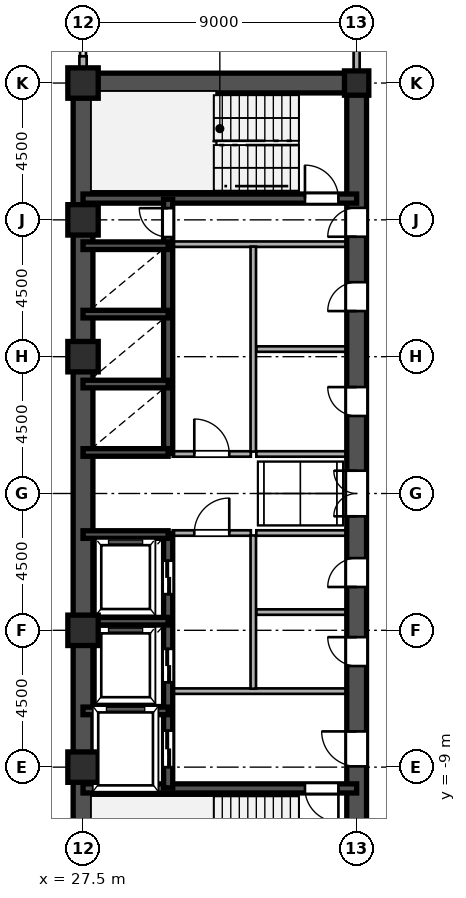
"""IFC4 building model, lengths in metres.
Left out: names, types, materials, properties, quantities, classifications, styles, units other than length and angle.
Written with IfcOpenShell. Run it as: python <this file> out.ifc"""

import sys

from ifc_helpers import new_model, si_unit, direction, frame, frame_2d, origin, origin_2d, place, context, subcontext, project, spatial, rectangle, hollow_rectangle, i_section, extrude, source, transform, mapped, element, fill, save


model = new_model("IFC4")
c1 = context("Model", 3, precision=1e-05, world=origin(), true_north=direction((0.0, 1.0)))
c2 = subcontext(c1, "Body", "Model", "MODEL_VIEW")
j1 = project(units=[si_unit("LENGTHUNIT", "METRE"), si_unit("PLANEANGLEUNIT", "RADIAN")], contexts=[c1])
p1 = place(None, origin())
s1 = spatial("IfcSite", under=j1, at=p1, CompositionType="ELEMENT")
p2 = place(p1, origin())
s2 = spatial("IfcBuilding", under=s1, at=p2, CompositionType="ELEMENT")
p3 = place(p2, frame((0.0, 0.0, 72.9)))
s3 = spatial("IfcBuildingStorey", under=s2, at=p3, CompositionType="ELEMENT", Elevation=72.9)
m1 = source(origin(), c2, "Body", "SweptSolid", [
    extrude(hollow_rectangle(XDim=1.0, YDim=1.0, WallThickness=0.042, at=origin_2d()), origin(), (0.0, 0.0, 1.0), 3.6),
])
for number, where, z_axis, x_axis in (
    (1, (27.5, -9.0, 0.0), (0.0, 0.0, 1.0), (1.0, 0.0, 0.0)),
    (2, (27.5, -4.5, 0.0), (0.0, 0.0, 1.0), (1.0, 0.0, 0.0)),
    (3, (27.5, 4.5, 0.0), (0.0, 0.0, 1.0), (1.0, 0.0, 0.0)),
    (4, (27.5, 9.0, 0.0), (0.0, 0.0, 1.0), (1.0, 0.0, 0.0)),
    (5, (27.5, 13.5, 0.0), (0.0, 0.0, 1.0), (1.0, 0.0, 0.0)),
):
    element("IfcColumn", number, at=place(p3, frame(where, z_axis=z_axis, x_axis=x_axis)), inside=s3, PredefinedType="COLUMN", context=c2, shape_type="MappedRepresentation", body=[
        mapped(m1, transform((0.0, 0.0, 0.0), scale=1.0)),
    ])
m2 = source(origin(), c2, "Body", "SweptSolid", [
    extrude(i_section(OverallWidth=0.8, OverallDepth=0.8, WebThickness=0.032, FlangeThickness=0.05, at=origin_2d()), origin(), (0.0, 0.0, 1.0), 3.6),
])
p4 = place(p3, frame((36.5, 13.5, 0.0), z_axis=(0.0, 0.0, 1.0), x_axis=(1.0, 0.0, 0.0)))
e6 = element("IfcColumn", 6, at=p4, inside=s3, PredefinedType="COLUMN", context=c2, shape_type="MappedRepresentation", body=[
    mapped(m2, transform((0.0, 0.0, 0.0), scale=1.0)),
])
p5 = place(p3, frame((27.5, 13.83, 0.0), z_axis=(0.0, 0.0, 1.0), x_axis=(0.0, 1.0, 0.0)))
e7 = element("IfcWall", 7, at=p5, inside=s3, PredefinedType="SOLIDWALL", context=c2, shape_type="SweptSolid", body=[
    extrude(rectangle(XDim=0.55, YDim=0.24, at=frame_2d((0.275, 0.0))), origin(), (0.0, 0.0, 1.0), 2.88),
])
for number, where, z_axis, x_axis in (
    (8, (27.5, -13.5, 0.0), (0.0, 0.0, 1.0), (0.0, 1.0, 0.0)),
    (9, (27.5, 1.3, 0.0), (0.0, 0.0, 1.0), (0.0, 1.0, 0.0)),
):
    element("IfcWall", number, at=place(p3, frame(where, z_axis=z_axis, x_axis=x_axis)), inside=s3, PredefinedType="SHEAR", context=c2, shape_type="SweptSolid", body=[
        extrude(rectangle(XDim=12.2, YDim=0.65, at=frame_2d((6.1, 0.0))), origin(), (0.0, 0.0, 1.0), 3.38),
    ])
p6 = place(p3, frame((27.5, -1.3, 0.0), z_axis=(0.0, 0.0, 1.0), x_axis=(0.0, 1.0, 0.0)))
e10 = element("IfcWall", 10, at=p6, inside=s3, PredefinedType="SHEAR", context=c2, shape_type="SweptSolid", body=[
    extrude(rectangle(XDim=2.6, YDim=0.65, at=frame_2d((1.3, 0.0))), origin(), (0.0, 0.0, 1.0), 3.38),
])
p7 = place(p3, frame((27.5, 13.5, 0.0), z_axis=(0.0, 0.0, 1.0), x_axis=(1.0, 0.0, 0.0)))
e11 = element("IfcWall", 11, at=p7, inside=s3, PredefinedType="SHEAR", context=c2, shape_type="SweptSolid", body=[
    extrude(rectangle(XDim=9.0, YDim=0.65, at=frame_2d((4.5, 0.0))), origin(), (0.0, 0.0, 1.0), 3.38),
])
p8 = place(p3, frame((36.5, -13.65, 0.0), z_axis=(0.0, 0.0, 1.0), x_axis=(0.0, 1.0, 0.0)))
e12 = element("IfcWall", 12, at=p8, inside=s3, PredefinedType="SHEAR", context=c2, shape_type="SweptSolid", body=[
    extrude(rectangle(XDim=7.15, YDim=0.65, at=frame_2d((3.575, 0.0))), origin(), (0.0, 0.0, 1.0), 3.38),
])
p9 = place(p8, frame((4.675, 0.0, 0.0)))
e13 = element("IfcOpeningElement", 13, at=p9, cuts=e12, PredefinedType="OPENING", context=c2, shape_type="SweptSolid", body=[
    extrude(rectangle(XDim=1.15, YDim=2.2, at=frame_2d((0.575, 1.1))), frame((0.0, 0.335, 0.0), z_axis=(0.0, -1.0, 0.0), x_axis=(1.0, 0.0, 0.0)), (0.0, 0.0, 1.0), 0.67),
])
p10 = place(p3, frame((36.5, -1.3, 0.0), z_axis=(0.0, 0.0, 1.0), x_axis=(0.0, 1.0, 0.0)))
e14 = element("IfcWall", 14, at=p10, inside=s3, PredefinedType="SHEAR", context=c2, shape_type="SweptSolid", body=[
    extrude(rectangle(XDim=2.6, YDim=0.65, at=frame_2d((1.3, 0.0))), origin(), (0.0, 0.0, 1.0), 3.38),
])
p11 = place(p10, frame((0.55, 0.0, 0.0)))
e15 = element("IfcOpeningElement", 15, at=p11, cuts=e14, PredefinedType="OPENING", context=c2, shape_type="SweptSolid", body=[
    extrude(rectangle(XDim=1.5, YDim=2.3, at=frame_2d((0.75, 1.15))), frame((0.0, 0.335, 0.0), z_axis=(0.0, -1.0, 0.0), x_axis=(1.0, 0.0, 0.0)), (0.0, 0.0, 1.0), 0.67),
])
p12 = place(p3, frame((36.5, 8.2, 0.0), z_axis=(0.0, 0.0, 1.0), x_axis=(0.0, 1.0, 0.0)))
e16 = element("IfcWall", 16, at=p12, inside=s3, PredefinedType="SHEAR", context=c2, shape_type="SweptSolid", body=[
    extrude(rectangle(XDim=5.45, YDim=0.65, at=frame_2d((2.725, 0.0))), origin(), (0.0, 0.0, 1.0), 3.38),
])
p13 = place(p12, frame((0.245, 0.0, 0.0)))
e17 = element("IfcOpeningElement", 17, at=p13, cuts=e16, PredefinedType="OPENING", context=c2, shape_type="SweptSolid", body=[
    extrude(rectangle(XDim=0.95, YDim=2.15, at=frame_2d((0.475, 1.075))), frame((0.0, 0.335, 0.0), z_axis=(0.0, -1.0, 0.0), x_axis=(1.0, 0.0, 0.0)), (0.0, 0.0, 1.0), 0.67),
])
p14 = place(p3, frame((36.5, -6.5, 0.0), z_axis=(0.0, 0.0, 1.0), x_axis=(0.0, 1.0, 0.0)))
e18 = element("IfcWall", 18, at=p14, inside=s3, PredefinedType="SHEAR", context=c2, shape_type="SweptSolid", body=[
    extrude(rectangle(XDim=2.6, YDim=0.65, at=frame_2d((1.3, 0.0))), origin(), (0.0, 0.0, 1.0), 3.38),
])
p15 = place(p14, frame((0.825, 0.0, 0.0)))
e19 = element("IfcOpeningElement", 19, at=p15, cuts=e18, PredefinedType="OPENING", context=c2, shape_type="SweptSolid", body=[
    extrude(rectangle(XDim=0.95, YDim=2.15, at=frame_2d((0.475, 1.075))), frame((0.0, 0.335, 0.0), z_axis=(0.0, -1.0, 0.0), x_axis=(1.0, 0.0, 0.0)), (0.0, 0.0, 1.0), 0.67),
])
p16 = place(p3, frame((36.5, -3.9, 0.0), z_axis=(0.0, 0.0, 1.0), x_axis=(0.0, 1.0, 0.0)))
e20 = element("IfcWall", 20, at=p16, inside=s3, PredefinedType="SHEAR", context=c2, shape_type="SweptSolid", body=[
    extrude(rectangle(XDim=2.6, YDim=0.65, at=frame_2d((1.3, 0.0))), origin(), (0.0, 0.0, 1.0), 3.38),
])
p17 = place(p16, frame((0.825, 0.0, 0.0)))
e21 = element("IfcOpeningElement", 21, at=p17, cuts=e20, PredefinedType="OPENING", context=c2, shape_type="SweptSolid", body=[
    extrude(rectangle(XDim=0.95, YDim=2.15, at=frame_2d((0.475, 1.075))), frame((0.0, 0.335, 0.0), z_axis=(0.0, -1.0, 0.0), x_axis=(1.0, 0.0, 0.0)), (0.0, 0.0, 1.0), 0.67),
])
p18 = place(p3, frame((36.5, 1.3, 0.0), z_axis=(0.0, 0.0, 1.0), x_axis=(0.0, 1.0, 0.0)))
e22 = element("IfcWall", 22, at=p18, inside=s3, PredefinedType="SHEAR", context=c2, shape_type="SweptSolid", body=[
    extrude(rectangle(XDim=3.45, YDim=0.65, at=frame_2d((1.725, 0.0))), origin(), (0.0, 0.0, 1.0), 3.38),
])
p19 = place(p18, frame((1.25, 0.0, 0.0)))
e23 = element("IfcOpeningElement", 23, at=p19, cuts=e22, PredefinedType="OPENING", context=c2, shape_type="SweptSolid", body=[
    extrude(rectangle(XDim=0.95, YDim=2.15, at=frame_2d((0.475, 1.075))), frame((0.0, 0.335, 0.0), z_axis=(0.0, -1.0, 0.0), x_axis=(1.0, 0.0, 0.0)), (0.0, 0.0, 1.0), 0.67),
])
p20 = place(p3, frame((36.5, 4.75, 0.0), z_axis=(0.0, 0.0, 1.0), x_axis=(0.0, 1.0, 0.0)))
e24 = element("IfcWall", 24, at=p20, inside=s3, PredefinedType="SHEAR", context=c2, shape_type="SweptSolid", body=[
    extrude(rectangle(XDim=3.45, YDim=0.65, at=frame_2d((1.725, 0.0))), origin(), (0.0, 0.0, 1.0), 3.38),
])
p21 = place(p20, frame((1.25, 0.0, 0.0)))
e25 = element("IfcOpeningElement", 25, at=p21, cuts=e24, PredefinedType="OPENING", context=c2, shape_type="SweptSolid", body=[
    extrude(rectangle(XDim=0.95, YDim=2.15, at=frame_2d((0.475, 1.075))), frame((0.0, 0.335, 0.0), z_axis=(0.0, -1.0, 0.0), x_axis=(1.0, 0.0, 0.0)), (0.0, 0.0, 1.0), 0.67),
])
p22 = place(p3, frame((27.5, -9.7, 0.0), z_axis=(0.0, 0.0, 1.0), x_axis=(1.0, 0.0, 0.0)))
e26 = element("IfcWall", 26, at=p22, inside=s3, PredefinedType="SHEAR", context=c2, shape_type="SweptSolid", body=[
    extrude(rectangle(XDim=9.0, YDim=0.3, at=frame_2d((4.5, 0.0))), origin(), (0.0, 0.0, 1.0), 3.38),
])
p23 = place(p22, frame((7.3, 0.0, 0.0)))
e27 = element("IfcOpeningElement", 27, at=p23, cuts=e26, PredefinedType="OPENING", context=c2, shape_type="SweptSolid", body=[
    extrude(rectangle(XDim=1.1, YDim=2.2, at=frame_2d((0.55, 1.1))), frame((0.0, 0.16, 0.0), z_axis=(0.0, -1.0, 0.0), x_axis=(1.0, 0.0, 0.0)), (0.0, 0.0, 1.0), 0.32),
])
p24 = place(p3, frame((27.5, 9.7, 0.0), z_axis=(0.0, 0.0, 1.0), x_axis=(1.0, 0.0, 0.0)))
e28 = element("IfcWall", 28, at=p24, inside=s3, PredefinedType="SHEAR", context=c2, shape_type="SweptSolid", body=[
    extrude(rectangle(XDim=9.0, YDim=0.3, at=frame_2d((4.5, 0.0))), origin(), (0.0, 0.0, 1.0), 3.38),
])
p25 = place(p24, frame((7.3, 0.0, 0.0)))
e29 = element("IfcOpeningElement", 29, at=p25, cuts=e28, PredefinedType="OPENING", context=c2, shape_type="SweptSolid", body=[
    extrude(rectangle(XDim=1.1, YDim=2.2, at=frame_2d((0.55, 1.1))), frame((0.0, 0.16, 0.0), z_axis=(0.0, -1.0, 0.0), x_axis=(1.0, 0.0, 0.0)), (0.0, 0.0, 1.0), 0.32),
])
for number, where, z_axis, x_axis in (
    (30, (27.5, -7.15, 0.0), (0.0, 0.0, 1.0), (1.0, 0.0, 0.0)),
    (31, (27.5, -4.2, 0.0), (0.0, 0.0, 1.0), (1.0, 0.0, 0.0)),
    (32, (27.5, -1.35, 0.0), (0.0, 0.0, 1.0), (1.0, 0.0, 0.0)),
    (33, (27.5, 1.35, 0.0), (0.0, 0.0, 1.0), (1.0, 0.0, 0.0)),
    (34, (27.5, 3.6, 0.0), (0.0, 0.0, 1.0), (1.0, 0.0, 0.0)),
    (35, (27.5, 5.9, 0.0), (0.0, 0.0, 1.0), (1.0, 0.0, 0.0)),
    (36, (27.5, 8.15, 0.0), (0.0, 0.0, 1.0), (1.0, 0.0, 0.0)),
):
    element("IfcWall", number, at=place(p3, frame(where, z_axis=z_axis, x_axis=x_axis)), inside=s3, PredefinedType="SHEAR", context=c2, shape_type="SweptSolid", body=[
        extrude(rectangle(XDim=2.8, YDim=0.25, at=frame_2d((1.4, 0.0))), origin(), (0.0, 0.0, 1.0), 3.38),
    ])
p26 = place(p3, frame((30.3, -9.68, 0.0), z_axis=(0.0, 0.0, 1.0), x_axis=(0.0, 1.0, 0.0)))
e37 = element("IfcWall", 37, at=p26, inside=s3, PredefinedType="SHEAR", context=c2, shape_type="SweptSolid", body=[
    extrude(rectangle(XDim=2.56, YDim=0.3, at=frame_2d((1.28, 0.0))), origin(), (0.0, 0.0, 1.0), 3.38),
])
p27 = place(p26, frame((0.68, 0.0, 0.0)))
e38 = element("IfcOpeningElement", 38, at=p27, cuts=e37, PredefinedType="OPENING", context=c2, shape_type="SweptSolid", body=[
    extrude(rectangle(XDim=1.2, YDim=2.25, at=frame_2d((0.6, 1.125))), frame((0.0, 0.16, 0.0), z_axis=(0.0, -1.0, 0.0), x_axis=(1.0, 0.0, 0.0)), (0.0, 0.0, 1.0), 0.32),
])
p28 = place(p3, frame((30.3, -7.12, 0.0), z_axis=(0.0, 0.0, 1.0), x_axis=(0.0, 1.0, 0.0)))
e39 = element("IfcWall", 39, at=p28, inside=s3, PredefinedType="SHEAR", context=c2, shape_type="SweptSolid", body=[
    extrude(rectangle(XDim=2.92, YDim=0.3, at=frame_2d((1.46, 0.0))), origin(), (0.0, 0.0, 1.0), 3.38),
])
p29 = place(p28, frame((0.91, 0.0, 0.0)))
e40 = element("IfcOpeningElement", 40, at=p29, cuts=e39, PredefinedType="OPENING", context=c2, shape_type="SweptSolid", body=[
    extrude(rectangle(XDim=1.1, YDim=2.2, at=frame_2d((0.55, 1.1))), frame((0.0, 0.16, 0.0), z_axis=(0.0, -1.0, 0.0), x_axis=(1.0, 0.0, 0.0)), (0.0, 0.0, 1.0), 0.32),
])
p30 = place(p3, frame((30.3, -4.2, 0.0), z_axis=(0.0, 0.0, 1.0), x_axis=(0.0, 1.0, 0.0)))
e41 = element("IfcWall", 41, at=p30, inside=s3, PredefinedType="SHEAR", context=c2, shape_type="SweptSolid", body=[
    extrude(rectangle(XDim=2.88, YDim=0.3, at=frame_2d((1.44, 0.0))), origin(), (0.0, 0.0, 1.0), 3.38),
])
p31 = place(p30, frame((0.89, 0.0, 0.0)))
e42 = element("IfcOpeningElement", 42, at=p31, cuts=e41, PredefinedType="OPENING", context=c2, shape_type="SweptSolid", body=[
    extrude(rectangle(XDim=1.1, YDim=2.2, at=frame_2d((0.55, 1.1))), frame((0.0, 0.16, 0.0), z_axis=(0.0, -1.0, 0.0), x_axis=(1.0, 0.0, 0.0)), (0.0, 0.0, 1.0), 0.32),
])
p32 = place(p3, frame((30.3, 1.32, 0.0), z_axis=(0.0, 0.0, 1.0), x_axis=(0.0, 1.0, 0.0)))
e43 = element("IfcWall", 43, at=p32, inside=s3, PredefinedType="SHEAR", context=c2, shape_type="SweptSolid", body=[
    extrude(rectangle(XDim=2.28, YDim=0.3, at=frame_2d((1.14, 0.0))), origin(), (0.0, 0.0, 1.0), 3.38),
])
p33 = place(p3, frame((30.3, 3.6, 0.0), z_axis=(0.0, 0.0, 1.0), x_axis=(0.0, 1.0, 0.0)))
e44 = element("IfcWall", 44, at=p33, inside=s3, PredefinedType="SHEAR", context=c2, shape_type="SweptSolid", body=[
    extrude(rectangle(XDim=2.3, YDim=0.3, at=frame_2d((1.15, 0.0))), origin(), (0.0, 0.0, 1.0), 3.38),
])
p34 = place(p3, frame((30.3, 5.9, 0.0), z_axis=(0.0, 0.0, 1.0), x_axis=(0.0, 1.0, 0.0)))
e45 = element("IfcWall", 45, at=p34, inside=s3, PredefinedType="SHEAR", context=c2, shape_type="SweptSolid", body=[
    extrude(rectangle(XDim=2.25, YDim=0.3, at=frame_2d((1.125, 0.0))), origin(), (0.0, 0.0, 1.0), 3.38),
])
p35 = place(p3, frame((30.3, 8.15, 0.0), z_axis=(0.0, 0.0, 1.0), x_axis=(0.0, 1.0, 0.0)))
e46 = element("IfcWall", 46, at=p35, inside=s3, PredefinedType="SHEAR", context=c2, shape_type="SweptSolid", body=[
    extrude(rectangle(XDim=1.53, YDim=0.3, at=frame_2d((0.765, 0.0))), origin(), (0.0, 0.0, 1.0), 3.38),
])
p36 = place(p35, frame((0.285, 0.0, 0.0)))
e47 = element("IfcOpeningElement", 47, at=p36, cuts=e46, PredefinedType="OPENING", context=c2, shape_type="SweptSolid", body=[
    extrude(rectangle(XDim=0.95, YDim=2.15, at=frame_2d((0.475, 1.075))), frame((0.0, 0.16, 0.0), z_axis=(0.0, -1.0, 0.0), x_axis=(1.0, 0.0, 0.0)), (0.0, 0.0, 1.0), 0.32),
])
for number, where, z_axis, x_axis in (
    (48, (30.45, -6.5, 0.0), (0.0, 0.0, 1.0), (1.0, 0.0, 0.0)),
    (49, (30.45, 8.2, 0.0), (0.0, 0.0, 1.0), (1.0, 0.0, 0.0)),
):
    element("IfcWall", number, at=place(p3, frame(where, z_axis=z_axis, x_axis=x_axis)), inside=s3, PredefinedType="PARTITIONING", context=c2, shape_type="SweptSolid", body=[
        extrude(rectangle(XDim=5.7, YDim=0.18, at=frame_2d((2.85, 0.0))), origin(), (0.0, 0.0, 1.0), 3.38),
    ])
p37 = place(p3, frame((33.1, -6.42, 0.0), z_axis=(0.0, 0.0, 1.0), x_axis=(0.0, 1.0, 0.0)))
e50 = element("IfcWall", 50, at=p37, inside=s3, PredefinedType="PARTITIONING", context=c2, shape_type="SweptSolid", body=[
    extrude(rectangle(XDim=5.04, YDim=0.18, at=frame_2d((2.52, 0.0))), origin(), (0.0, 0.0, 1.0), 3.38),
])
p38 = place(p3, frame((33.1, 1.38, 0.0), z_axis=(0.0, 0.0, 1.0), x_axis=(0.0, 1.0, 0.0)))
e51 = element("IfcWall", 51, at=p38, inside=s3, PredefinedType="PARTITIONING", context=c2, shape_type="SweptSolid", body=[
    extrude(rectangle(XDim=6.74, YDim=0.18, at=frame_2d((3.37, 0.0))), origin(), (0.0, 0.0, 1.0), 3.38),
])
p39 = place(p3, frame((30.45, -1.3, 0.0), z_axis=(0.0, 0.0, 1.0), x_axis=(1.0, 0.0, 0.0)))
e52 = element("IfcWall", 52, at=p39, inside=s3, PredefinedType="PARTITIONING", context=c2, shape_type="SweptSolid", body=[
    extrude(rectangle(XDim=2.57, YDim=0.18, at=frame_2d((1.285, 0.0))), origin(), (0.0, 0.0, 1.0), 3.38),
])
p40 = place(p39, frame((0.71, 0.0, 0.0)))
e53 = element("IfcOpeningElement", 53, at=p40, cuts=e52, PredefinedType="OPENING", context=c2, shape_type="SweptSolid", body=[
    extrude(rectangle(XDim=1.15, YDim=2.2, at=frame_2d((0.575, 1.1))), frame((0.0, 0.1, 0.0), z_axis=(0.0, -1.0, 0.0), x_axis=(1.0, 0.0, 0.0)), (0.0, 0.0, 1.0), 0.2),
])
p41 = place(p3, frame((30.45, 1.3, 0.0), z_axis=(0.0, 0.0, 1.0), x_axis=(1.0, 0.0, 0.0)))
e54 = element("IfcWall", 54, at=p41, inside=s3, PredefinedType="PARTITIONING", context=c2, shape_type="SweptSolid", body=[
    extrude(rectangle(XDim=2.57, YDim=0.18, at=frame_2d((1.285, 0.0))), origin(), (0.0, 0.0, 1.0), 3.38),
])
p42 = place(p41, frame((0.71, 0.0, 0.0)))
e55 = element("IfcOpeningElement", 55, at=p42, cuts=e54, PredefinedType="OPENING", context=c2, shape_type="SweptSolid", body=[
    extrude(rectangle(XDim=1.15, YDim=2.2, at=frame_2d((0.575, 1.1))), frame((0.0, 0.1, 0.0), z_axis=(0.0, -1.0, 0.0), x_axis=(1.0, 0.0, 0.0)), (0.0, 0.0, 1.0), 0.2),
])
for number, where, z_axis, x_axis in (
    (56, (33.2, -1.3, 0.0), (0.0, 0.0, 1.0), (1.0, 0.0, 0.0)),
    (57, (33.2, 1.3, 0.0), (0.0, 0.0, 1.0), (1.0, 0.0, 0.0)),
    (58, (33.2, -3.9, 0.0), (0.0, 0.0, 1.0), (1.0, 0.0, 0.0)),
    (59, (33.2, 4.75, 0.0), (0.0, 0.0, 1.0), (1.0, 0.0, 0.0)),
):
    element("IfcWall", number, at=place(p3, frame(where, z_axis=z_axis, x_axis=x_axis)), inside=s3, PredefinedType="PARTITIONING", context=c2, shape_type="SweptSolid", body=[
        extrude(rectangle(XDim=2.95, YDim=0.18, at=frame_2d((1.475, 0.0))), origin(), (0.0, 0.0, 1.0), 3.38),
    ])
p43 = place(p3, frame((36.5, 13.83, 0.0), z_axis=(0.0, 0.0, 1.0), x_axis=(0.0, 1.0, 0.0)))
e60 = element("IfcWall", 60, at=p43, inside=s3, PredefinedType="PARTITIONING", context=c2, shape_type="SweptSolid", body=[
    extrude(rectangle(XDim=1.685, YDim=0.2, at=frame_2d((0.842, 0.0))), origin(), (0.0, 0.0, 1.0), 2.68),
])
m3 = source(origin(), c2, "Body", "SweptSolid", [
    extrude(rectangle(XDim=1.15, YDim=2.2, at=frame_2d((0.575, 1.1))), frame((0.0, 0.025, 0.0), z_axis=(0.0, -1.0, 0.0), x_axis=(1.0, 0.0, 0.0)), (0.0, 0.0, 1.0), 0.05),
])
p44 = place(p9, origin())
e61 = element("IfcDoor", 61, at=p44, inside=s3, OperationType="SINGLE_SWING_RIGHT", PredefinedType="DOOR", context=c2, shape_type="MappedRepresentation", body=[
    mapped(m3, transform((0.0, 0.0, 0.0), scale=1.0)),
])
fill(e13, e61)
m4 = source(origin(), c2, "Body", "SweptSolid", [
    extrude(rectangle(XDim=1.5, YDim=2.3, at=frame_2d((0.75, 1.15))), frame((0.0, 0.025, 0.0), z_axis=(0.0, -1.0, 0.0), x_axis=(1.0, 0.0, 0.0)), (0.0, 0.0, 1.0), 0.05),
])
p45 = place(p11, origin())
e62 = element("IfcDoor", 62, at=p45, inside=s3, OperationType="DOUBLE_SWING_LEFT", PredefinedType="DOOR", context=c2, shape_type="MappedRepresentation", body=[
    mapped(m4, transform((0.0, 0.0, 0.0), scale=1.0)),
])
fill(e15, e62)
m5 = source(origin(), c2, "Body", "SweptSolid", [
    extrude(rectangle(XDim=0.95, YDim=2.15, at=frame_2d((0.475, 1.075))), frame((0.0, 0.025, 0.0), z_axis=(0.0, -1.0, 0.0), x_axis=(1.0, 0.0, 0.0)), (0.0, 0.0, 1.0), 0.05),
])
p46 = place(p13, origin())
e63 = element("IfcDoor", 63, at=p46, inside=s3, OperationType="SINGLE_SWING_LEFT", PredefinedType="DOOR", context=c2, shape_type="MappedRepresentation", body=[
    mapped(m5, transform((0.0, 0.0, 0.0), scale=1.0)),
])
fill(e17, e63)
p47 = place(p15, origin())
e64 = element("IfcDoor", 64, at=p47, inside=s3, OperationType="SINGLE_SWING_RIGHT", PredefinedType="DOOR", context=c2, shape_type="MappedRepresentation", body=[
    mapped(m5, transform((0.0, 0.0, 0.0), scale=1.0)),
])
fill(e19, e64)
p48 = place(p17, origin())
e65 = element("IfcDoor", 65, at=p48, inside=s3, OperationType="SINGLE_SWING_LEFT", PredefinedType="DOOR", context=c2, shape_type="MappedRepresentation", body=[
    mapped(m5, transform((0.0, 0.0, 0.0), scale=1.0)),
])
fill(e21, e65)
p49 = place(p19, origin())
e66 = element("IfcDoor", 66, at=p49, inside=s3, OperationType="SINGLE_SWING_RIGHT", PredefinedType="DOOR", context=c2, shape_type="MappedRepresentation", body=[
    mapped(m5, transform((0.0, 0.0, 0.0), scale=1.0)),
])
fill(e23, e66)
p50 = place(p21, origin())
e67 = element("IfcDoor", 67, at=p50, inside=s3, OperationType="SINGLE_SWING_LEFT", PredefinedType="DOOR", context=c2, shape_type="MappedRepresentation", body=[
    mapped(m5, transform((0.0, 0.0, 0.0), scale=1.0)),
])
fill(e25, e67)
m6 = source(origin(), c2, "Body", "SweptSolid", [
    extrude(rectangle(XDim=1.1, YDim=2.2, at=frame_2d((0.55, 1.1))), frame((0.0, 0.025, 0.0), z_axis=(0.0, -1.0, 0.0), x_axis=(1.0, 0.0, 0.0)), (0.0, 0.0, 1.0), 0.05),
])
p51 = place(p23, frame((1.1, 0.0, 0.0), z_axis=(0.0, 0.0, 1.0), x_axis=(-1.0, 0.0, 0.0)))
e68 = element("IfcDoor", 68, at=p51, inside=s3, OperationType="SINGLE_SWING_RIGHT", PredefinedType="DOOR", context=c2, shape_type="MappedRepresentation", body=[
    mapped(m6, transform((0.0, 0.0, 0.0), scale=1.0)),
])
fill(e27, e68)
p52 = place(p25, origin())
e69 = element("IfcDoor", 69, at=p52, inside=s3, OperationType="SINGLE_SWING_LEFT", PredefinedType="DOOR", context=c2, shape_type="MappedRepresentation", body=[
    mapped(m6, transform((0.0, 0.0, 0.0), scale=1.0)),
])
fill(e29, e69)
m7 = source(origin(), c2, "Body", "SweptSolid", [
    extrude(rectangle(XDim=1.2, YDim=2.25, at=frame_2d((0.6, 1.125))), frame((0.0, 0.025, 0.0), z_axis=(0.0, -1.0, 0.0), x_axis=(1.0, 0.0, 0.0)), (0.0, 0.0, 1.0), 0.05),
])
p53 = place(p27, origin())
e70 = element("IfcDoor", 70, at=p53, inside=s3, OperationType="DOUBLE_DOOR_SLIDING", PredefinedType="DOOR", context=c2, shape_type="MappedRepresentation", body=[
    mapped(m7, transform((0.0, 0.0, 0.0), scale=1.0)),
])
fill(e38, e70)
m8 = source(origin(), c2, "Body", "SweptSolid", [
    extrude(rectangle(XDim=1.1, YDim=2.2, at=frame_2d((0.55, 1.1))), frame((0.0, 0.025, 0.0), z_axis=(0.0, -1.0, 0.0), x_axis=(1.0, 0.0, 0.0)), (0.0, 0.0, 1.0), 0.05),
])
p54 = place(p29, origin())
e71 = element("IfcDoor", 71, at=p54, inside=s3, OperationType="DOUBLE_DOOR_SLIDING", PredefinedType="DOOR", context=c2, shape_type="MappedRepresentation", body=[
    mapped(m8, transform((0.0, 0.0, 0.0), scale=1.0)),
])
fill(e40, e71)
p55 = place(p31, origin())
e72 = element("IfcDoor", 72, at=p55, inside=s3, OperationType="DOUBLE_DOOR_SLIDING", PredefinedType="DOOR", context=c2, shape_type="MappedRepresentation", body=[
    mapped(m8, transform((0.0, 0.0, 0.0), scale=1.0)),
])
fill(e42, e72)
p56 = place(p36, origin())
e73 = element("IfcDoor", 73, at=p56, inside=s3, OperationType="SINGLE_SWING_RIGHT", PredefinedType="DOOR", context=c2, shape_type="MappedRepresentation", body=[
    mapped(m5, transform((0.0, 0.0, 0.0), scale=1.0)),
])
fill(e47, e73)
p57 = place(p40, origin())
e74 = element("IfcDoor", 74, at=p57, inside=s3, OperationType="SINGLE_SWING_RIGHT", PredefinedType="DOOR", context=c2, shape_type="MappedRepresentation", body=[
    mapped(m3, transform((0.0, 0.0, 0.0), scale=1.0)),
])
fill(e53, e74)
p58 = place(p42, origin())
e75 = element("IfcDoor", 75, at=p58, inside=s3, OperationType="SINGLE_SWING_LEFT", PredefinedType="DOOR", context=c2, shape_type="MappedRepresentation", body=[
    mapped(m3, transform((0.0, 0.0, 0.0), scale=1.0)),
])
fill(e55, e75)
save(model, sys.argv[1])
